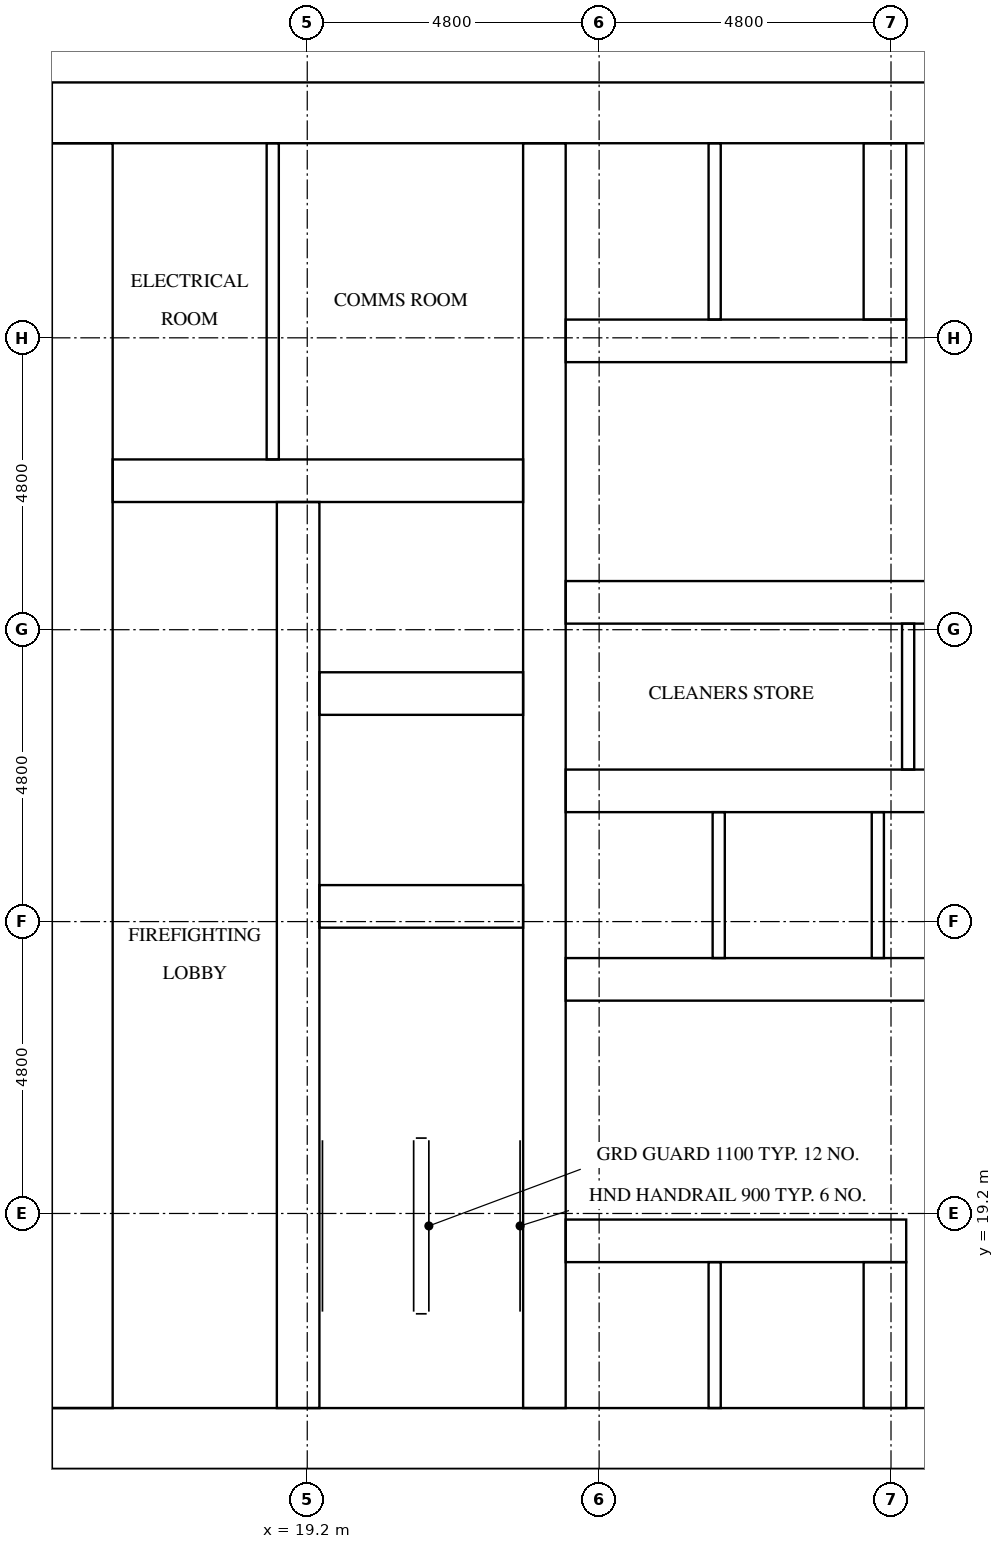
"""IFC4 building model, lengths in metres.
Left out: names, types, materials, properties, quantities, classifications, styles, units other than length and angle.
Written with IfcOpenShell. Run it as: python <this file> out.ifc"""

import sys

from ifc_helpers import new_model, si_unit, direction, frame, frame_2d, origin, place, context, subcontext, project, spatial, rectangle, extrude, element, fill, save


model = new_model("IFC4")
c1 = context("Model", 3, precision=1e-05, world=origin(), true_north=direction((0.0, 1.0)))
c2 = subcontext(c1, "Body", "Model", "MODEL_VIEW")
j1 = project(units=[si_unit("LENGTHUNIT", "METRE"), si_unit("PLANEANGLEUNIT", "RADIAN")], contexts=[c1])
p1 = place(None, origin())
s1 = spatial("IfcSite", under=j1, at=p1, CompositionType="ELEMENT")
p2 = place(p1, origin())
s2 = spatial("IfcBuilding", under=s1, at=p2, CompositionType="ELEMENT")
p3 = place(p2, frame((0.0, 0.0, 32.9)))
s3 = spatial("IfcBuildingStorey", under=s2, at=p3, CompositionType="ELEMENT", Elevation=32.9)
p4 = place(p3, frame((15.0, 15.5, 0.0), z_axis=(0.0, 0.0, 1.0), x_axis=(1.0, 0.0, 0.0)))
e1 = element("IfcWall", 1, at=p4, inside=s3, PredefinedType="SHEAR", context=c2, shape_type="SweptSolid", body=[
    extrude(rectangle(XDim=32.4, YDim=1.0, at=frame_2d((16.2, 0.0))), origin(), (0.0, 0.0, 1.0), 3.2),
])
p5 = place(p4, frame((15.3, 0.0, 0.0)))
e2 = element("IfcOpeningElement", 2, at=p5, cuts=e1, PredefinedType="OPENING", context=c2, shape_type="SweptSolid", body=[
    extrude(rectangle(XDim=1.8, YDim=2.1, at=frame_2d((0.9, 1.05))), frame((0.0, 0.51, 0.0), z_axis=(0.0, -1.0, 0.0), x_axis=(1.0, 0.0, 0.0)), (0.0, 0.0, 1.0), 1.02),
])
p6 = place(p3, frame((15.0, 37.3, 0.0), z_axis=(0.0, 0.0, 1.0), x_axis=(1.0, 0.0, 0.0)))
e3 = element("IfcWall", 3, at=p6, inside=s3, PredefinedType="SHEAR", context=c2, shape_type="SweptSolid", body=[
    extrude(rectangle(XDim=32.4, YDim=1.0, at=frame_2d((16.2, 0.0))), origin(), (0.0, 0.0, 1.0), 3.2),
])
p7 = place(p6, frame((15.3, 0.0, 0.0)))
e4 = element("IfcOpeningElement", 4, at=p7, cuts=e3, PredefinedType="OPENING", context=c2, shape_type="SweptSolid", body=[
    extrude(rectangle(XDim=1.8, YDim=2.1, at=frame_2d((0.9, 1.05))), frame((0.0, 0.51, 0.0), z_axis=(0.0, -1.0, 0.0), x_axis=(1.0, 0.0, 0.0)), (0.0, 0.0, 1.0), 1.02),
])
p8 = place(p6, frame((1.766, 0.0, 0.0)))
e5 = element("IfcOpeningElement", 5, at=p8, cuts=e3, PredefinedType="OPENING", context=c2, shape_type="SweptSolid", body=[
    extrude(rectangle(XDim=1.0, YDim=2.1, at=frame_2d((0.5, 1.05))), frame((0.0, 0.51, 0.0), z_axis=(0.0, -1.0, 0.0), x_axis=(1.0, 0.0, 0.0)), (0.0, 0.0, 1.0), 1.02),
])
p9 = place(p6, frame((5.241, 0.0, 0.0)))
e6 = element("IfcOpeningElement", 6, at=p9, cuts=e3, PredefinedType="OPENING", context=c2, shape_type="SweptSolid", body=[
    extrude(rectangle(XDim=1.0, YDim=2.1, at=frame_2d((0.5, 1.05))), frame((0.0, 0.51, 0.0), z_axis=(0.0, -1.0, 0.0), x_axis=(1.0, 0.0, 0.0)), (0.0, 0.0, 1.0), 1.02),
])
p10 = place(p3, frame((15.5, 16.0, 0.0), z_axis=(0.0, 0.0, 1.0), x_axis=(0.0, 1.0, 0.0)))
e7 = element("IfcWall", 7, at=p10, inside=s3, PredefinedType="SHEAR", context=c2, shape_type="SweptSolid", body=[
    extrude(rectangle(XDim=20.8, YDim=1.0, at=frame_2d((10.4, 0.0))), origin(), (0.0, 0.0, 1.0), 3.2),
])
p11 = place(p10, frame((4.76, 0.0, 0.0)))
e8 = element("IfcOpeningElement", 8, at=p11, cuts=e7, PredefinedType="OPENING", context=c2, shape_type="SweptSolid", body=[
    extrude(rectangle(XDim=1.2, YDim=2.1, at=frame_2d((0.6, 1.05))), frame((0.0, 0.51, 0.0), z_axis=(0.0, -1.0, 0.0), x_axis=(1.0, 0.0, 0.0)), (0.0, 0.0, 1.0), 1.02),
])
p12 = place(p3, frame((19.05, 16.0, 0.0), z_axis=(0.0, 0.0, 1.0), x_axis=(0.0, 1.0, 0.0)))
e9 = element("IfcWall", 9, at=p12, inside=s3, PredefinedType="SHEAR", context=c2, shape_type="SweptSolid", body=[
    extrude(rectangle(XDim=14.9, YDim=0.7, at=frame_2d((7.45, 0.0))), origin(), (0.0, 0.0, 1.0), 3.2),
])
p13 = place(p12, frame((9.45, 0.0, 0.0)))
e10 = element("IfcOpeningElement", 10, at=p13, cuts=e9, PredefinedType="OPENING", context=c2, shape_type="SweptSolid", body=[
    extrude(rectangle(XDim=1.1, YDim=2.1, at=frame_2d((0.55, 1.05))), frame((0.0, 0.36, 0.0), z_axis=(0.0, -1.0, 0.0), x_axis=(1.0, 0.0, 0.0)), (0.0, 0.0, 1.0), 0.72),
])
p14 = place(p12, frame((12.95, 0.0, 0.0)))
e11 = element("IfcOpeningElement", 11, at=p14, cuts=e9, PredefinedType="OPENING", context=c2, shape_type="SweptSolid", body=[
    extrude(rectangle(XDim=1.1, YDim=2.1, at=frame_2d((0.55, 1.05))), frame((0.0, 0.36, 0.0), z_axis=(0.0, -1.0, 0.0), x_axis=(1.0, 0.0, 0.0)), (0.0, 0.0, 1.0), 0.72),
])
p15 = place(p12, frame((0.2, 0.0, 0.0)))
e12 = element("IfcOpeningElement", 12, at=p15, cuts=e9, PredefinedType="OPENING", context=c2, shape_type="SweptSolid", body=[
    extrude(rectangle(XDim=1.2, YDim=2.1, at=frame_2d((0.6, 1.05))), frame((0.0, 0.36, 0.0), z_axis=(0.0, -1.0, 0.0), x_axis=(1.0, 0.0, 0.0)), (0.0, 0.0, 1.0), 0.72),
])
p16 = place(p3, frame((23.1, 16.0, 0.0), z_axis=(0.0, 0.0, 1.0), x_axis=(0.0, 1.0, 0.0)))
e13 = element("IfcWall", 13, at=p16, inside=s3, PredefinedType="SHEAR", context=c2, shape_type="SweptSolid", body=[
    extrude(rectangle(XDim=20.8, YDim=0.7, at=frame_2d((10.4, 0.0))), origin(), (0.0, 0.0, 1.0), 3.2),
])
for number, where, z_axis, x_axis in (
    (14, (19.4, 24.25, 0.0), (0.0, 0.0, 1.0), (1.0, 0.0, 0.0)),
    (15, (19.4, 27.75, 0.0), (0.0, 0.0, 1.0), (1.0, 0.0, 0.0)),
):
    element("IfcWall", number, at=place(p3, frame(where, z_axis=z_axis, x_axis=x_axis)), inside=s3, PredefinedType="SHEAR", context=c2, shape_type="SweptSolid", body=[
        extrude(rectangle(XDim=3.35, YDim=0.7, at=frame_2d((1.675, 0.0))), origin(), (0.0, 0.0, 1.0), 3.2),
    ])
p17 = place(p3, frame((16.0, 31.25, 0.0), z_axis=(0.0, 0.0, 1.0), x_axis=(1.0, 0.0, 0.0)))
e16 = element("IfcWall", 16, at=p17, inside=s3, PredefinedType="SHEAR", context=c2, shape_type="SweptSolid", body=[
    extrude(rectangle(XDim=6.75, YDim=0.7, at=frame_2d((3.375, 0.0))), origin(), (0.0, 0.0, 1.0), 3.2),
])
p18 = place(p3, frame((23.45, 18.75, 0.0), z_axis=(0.0, 0.0, 1.0), x_axis=(1.0, 0.0, 0.0)))
e17 = element("IfcWall", 17, at=p18, inside=s3, PredefinedType="SHEAR", context=c2, shape_type="SweptSolid", body=[
    extrude(rectangle(XDim=5.6, YDim=0.7, at=frame_2d((2.8, 0.0))), origin(), (0.0, 0.0, 1.0), 3.2),
])
p19 = place(p18, frame((0.625, 0.0, 0.0)))
e18 = element("IfcOpeningElement", 18, at=p19, cuts=e17, PredefinedType="OPENING", context=c2, shape_type="SweptSolid", body=[
    extrude(rectangle(XDim=1.1, YDim=2.1, at=frame_2d((0.55, 1.05))), frame((0.0, 0.36, 0.0), z_axis=(0.0, -1.0, 0.0), x_axis=(1.0, 0.0, 0.0)), (0.0, 0.0, 1.0), 0.72),
])
p20 = place(p18, frame((3.175, 0.0, 0.0)))
e19 = element("IfcOpeningElement", 19, at=p20, cuts=e17, PredefinedType="OPENING", context=c2, shape_type="SweptSolid", body=[
    extrude(rectangle(XDim=1.1, YDim=2.1, at=frame_2d((0.55, 1.05))), frame((0.0, 0.36, 0.0), z_axis=(0.0, -1.0, 0.0), x_axis=(1.0, 0.0, 0.0)), (0.0, 0.0, 1.0), 0.72),
])
p21 = place(p3, frame((23.45, 23.05, 0.0), z_axis=(0.0, 0.0, 1.0), x_axis=(1.0, 0.0, 0.0)))
e20 = element("IfcWall", 20, at=p21, inside=s3, PredefinedType="SHEAR", context=c2, shape_type="SweptSolid", body=[
    extrude(rectangle(XDim=15.5, YDim=0.7, at=frame_2d((7.75, 0.0))), origin(), (0.0, 0.0, 1.0), 3.2),
])
p22 = place(p21, frame((0.658, 0.0, 0.0)))
e21 = element("IfcOpeningElement", 21, at=p22, cuts=e20, PredefinedType="OPENING", context=c2, shape_type="SweptSolid", body=[
    extrude(rectangle(XDim=1.1, YDim=2.1, at=frame_2d((0.55, 1.05))), frame((0.0, 0.36, 0.0), z_axis=(0.0, -1.0, 0.0), x_axis=(1.0, 0.0, 0.0)), (0.0, 0.0, 1.0), 0.72),
])
p23 = place(p21, frame((3.275, 0.0, 0.0)))
e22 = element("IfcOpeningElement", 22, at=p23, cuts=e20, PredefinedType="OPENING", context=c2, shape_type="SweptSolid", body=[
    extrude(rectangle(XDim=1.1, YDim=2.1, at=frame_2d((0.55, 1.05))), frame((0.0, 0.36, 0.0), z_axis=(0.0, -1.0, 0.0), x_axis=(1.0, 0.0, 0.0)), (0.0, 0.0, 1.0), 0.72),
])
p24 = place(p21, frame((10.772, 0.0, 0.0)))
e23 = element("IfcOpeningElement", 23, at=p24, cuts=e20, PredefinedType="OPENING", context=c2, shape_type="SweptSolid", body=[
    extrude(rectangle(XDim=1.0, YDim=2.1, at=frame_2d((0.5, 1.05))), frame((0.0, 0.36, 0.0), z_axis=(0.0, -1.0, 0.0), x_axis=(1.0, 0.0, 0.0)), (0.0, 0.0, 1.0), 0.72),
])
p25 = place(p21, frame((13.389, 0.0, 0.0)))
e24 = element("IfcOpeningElement", 24, at=p25, cuts=e20, PredefinedType="OPENING", context=c2, shape_type="SweptSolid", body=[
    extrude(rectangle(XDim=1.0, YDim=2.1, at=frame_2d((0.5, 1.05))), frame((0.0, 0.36, 0.0), z_axis=(0.0, -1.0, 0.0), x_axis=(1.0, 0.0, 0.0)), (0.0, 0.0, 1.0), 0.72),
])
p26 = place(p3, frame((23.45, 26.15, 0.0), z_axis=(0.0, 0.0, 1.0), x_axis=(1.0, 0.0, 0.0)))
e25 = element("IfcWall", 25, at=p26, inside=s3, PredefinedType="SHEAR", context=c2, shape_type="SweptSolid", body=[
    extrude(rectangle(XDim=15.5, YDim=0.7, at=frame_2d((7.75, 0.0))), origin(), (0.0, 0.0, 1.0), 3.2),
])
p27 = place(p3, frame((23.45, 29.25, 0.0), z_axis=(0.0, 0.0, 1.0), x_axis=(1.0, 0.0, 0.0)))
e26 = element("IfcWall", 26, at=p27, inside=s3, PredefinedType="SHEAR", context=c2, shape_type="SweptSolid", body=[
    extrude(rectangle(XDim=15.5, YDim=0.7, at=frame_2d((7.75, 0.0))), origin(), (0.0, 0.0, 1.0), 3.2),
])
p28 = place(p27, frame((2.266, 0.0, 0.0)))
e27 = element("IfcOpeningElement", 27, at=p28, cuts=e26, PredefinedType="OPENING", context=c2, shape_type="SweptSolid", body=[
    extrude(rectangle(XDim=1.0, YDim=2.1, at=frame_2d((0.5, 1.05))), frame((0.0, 0.36, 0.0), z_axis=(0.0, -1.0, 0.0), x_axis=(1.0, 0.0, 0.0)), (0.0, 0.0, 1.0), 0.72),
])
p29 = place(p27, frame((7.018, 0.0, 0.0)))
e28 = element("IfcOpeningElement", 28, at=p29, cuts=e26, PredefinedType="OPENING", context=c2, shape_type="SweptSolid", body=[
    extrude(rectangle(XDim=1.0, YDim=2.1, at=frame_2d((0.5, 1.05))), frame((0.0, 0.36, 0.0), z_axis=(0.0, -1.0, 0.0), x_axis=(1.0, 0.0, 0.0)), (0.0, 0.0, 1.0), 0.72),
])
p30 = place(p27, frame((12.002, 0.0, 0.0)))
e29 = element("IfcOpeningElement", 29, at=p30, cuts=e26, PredefinedType="OPENING", context=c2, shape_type="SweptSolid", body=[
    extrude(rectangle(XDim=1.0, YDim=2.1, at=frame_2d((0.5, 1.05))), frame((0.0, 0.36, 0.0), z_axis=(0.0, -1.0, 0.0), x_axis=(1.0, 0.0, 0.0)), (0.0, 0.0, 1.0), 0.72),
])
p31 = place(p3, frame((23.45, 33.55, 0.0), z_axis=(0.0, 0.0, 1.0), x_axis=(1.0, 0.0, 0.0)))
e30 = element("IfcWall", 30, at=p31, inside=s3, PredefinedType="SHEAR", context=c2, shape_type="SweptSolid", body=[
    extrude(rectangle(XDim=5.6, YDim=0.7, at=frame_2d((2.8, 0.0))), origin(), (0.0, 0.0, 1.0), 3.2),
])
p32 = place(p3, frame((28.7, 16.0, 0.0), z_axis=(0.0, 0.0, 1.0), x_axis=(0.0, 1.0, 0.0)))
e31 = element("IfcWall", 31, at=p32, inside=s3, PredefinedType="SHEAR", context=c2, shape_type="SweptSolid", body=[
    extrude(rectangle(XDim=2.4, YDim=0.7, at=frame_2d((1.2, 0.0))), origin(), (0.0, 0.0, 1.0), 3.2),
])
p33 = place(p3, frame((28.7, 33.9, 0.0), z_axis=(0.0, 0.0, 1.0), x_axis=(0.0, 1.0, 0.0)))
e32 = element("IfcWall", 32, at=p33, inside=s3, PredefinedType="SHEAR", context=c2, shape_type="SweptSolid", body=[
    extrude(rectangle(XDim=2.9, YDim=0.7, at=frame_2d((1.45, 0.0))), origin(), (0.0, 0.0, 1.0), 3.2),
])
for number, where, z_axis, x_axis in (
    (33, (25.967, 23.4, 0.0), (0.0, 0.0, 1.0), (0.0, 1.0, 0.0)),
    (34, (28.583, 23.4, 0.0), (0.0, 0.0, 1.0), (0.0, 1.0, 0.0)),
):
    element("IfcWall", number, at=place(p3, frame(where, z_axis=z_axis, x_axis=x_axis)), inside=s3, PredefinedType="SOLIDWALL", context=c2, shape_type="SweptSolid", body=[
        extrude(rectangle(XDim=2.4, YDim=0.2, at=frame_2d((1.2, 0.0))), origin(), (0.0, 0.0, 1.0), 3.2),
    ])
p34 = place(p3, frame((25.9, 16.0, 0.0), z_axis=(0.0, 0.0, 1.0), x_axis=(0.0, 1.0, 0.0)))
e35 = element("IfcWall", 35, at=p34, inside=s3, PredefinedType="SOLIDWALL", context=c2, shape_type="SweptSolid", body=[
    extrude(rectangle(XDim=2.4, YDim=0.2, at=frame_2d((1.2, 0.0))), origin(), (0.0, 0.0, 1.0), 3.2),
])
p35 = place(p3, frame((25.9, 33.9, 0.0), z_axis=(0.0, 0.0, 1.0), x_axis=(0.0, 1.0, 0.0)))
e36 = element("IfcWall", 36, at=p35, inside=s3, PredefinedType="SOLIDWALL", context=c2, shape_type="SweptSolid", body=[
    extrude(rectangle(XDim=2.9, YDim=0.2, at=frame_2d((1.45, 0.0))), origin(), (0.0, 0.0, 1.0), 3.2),
])
p36 = place(p3, frame((18.633, 31.6, 0.0), z_axis=(0.0, 0.0, 1.0), x_axis=(0.0, 1.0, 0.0)))
e37 = element("IfcWall", 37, at=p36, inside=s3, PredefinedType="PARTITIONING", context=c2, shape_type="SweptSolid", body=[
    extrude(rectangle(XDim=5.2, YDim=0.2, at=frame_2d((2.6, 0.0))), origin(), (0.0, 0.0, 1.0), 3.2),
])
p37 = place(p3, frame((29.082, 26.5, 0.0), z_axis=(0.0, 0.0, 1.0), x_axis=(0.0, 1.0, 0.0)))
e38 = element("IfcWall", 38, at=p37, inside=s3, PredefinedType="PARTITIONING", context=c2, shape_type="SweptSolid", body=[
    extrude(rectangle(XDim=2.4, YDim=0.2, at=frame_2d((1.2, 0.0))), origin(), (0.0, 0.0, 1.0), 3.2),
])
p38 = place(p19, origin())
e39 = element("IfcDoor", 39, at=p38, inside=s3, OperationType="DOUBLE_DOOR_SLIDING", PredefinedType="DOOR", context=c2, shape_type="SweptSolid", body=[
    extrude(rectangle(XDim=1.1, YDim=2.1, at=frame_2d((0.55, 1.05))), frame((0.0, 0.025, 0.0), z_axis=(0.0, -1.0, 0.0), x_axis=(1.0, 0.0, 0.0)), (0.0, 0.0, 1.0), 0.05),
])
fill(e18, e39)
p39 = place(p20, origin())
e40 = element("IfcDoor", 40, at=p39, inside=s3, OperationType="DOUBLE_DOOR_SLIDING", PredefinedType="DOOR", context=c2, shape_type="SweptSolid", body=[
    extrude(rectangle(XDim=1.1, YDim=2.1, at=frame_2d((0.55, 1.05))), frame((0.0, 0.025, 0.0), z_axis=(0.0, -1.0, 0.0), x_axis=(1.0, 0.0, 0.0)), (0.0, 0.0, 1.0), 0.05),
])
fill(e19, e40)
p40 = place(p22, origin())
e41 = element("IfcDoor", 41, at=p40, inside=s3, OperationType="DOUBLE_DOOR_SLIDING", PredefinedType="DOOR", context=c2, shape_type="SweptSolid", body=[
    extrude(rectangle(XDim=1.1, YDim=2.1, at=frame_2d((0.55, 1.05))), frame((0.0, 0.025, 0.0), z_axis=(0.0, -1.0, 0.0), x_axis=(1.0, 0.0, 0.0)), (0.0, 0.0, 1.0), 0.05),
])
fill(e21, e41)
p41 = place(p23, origin())
e42 = element("IfcDoor", 42, at=p41, inside=s3, OperationType="DOUBLE_DOOR_SLIDING", PredefinedType="DOOR", context=c2, shape_type="SweptSolid", body=[
    extrude(rectangle(XDim=1.1, YDim=2.1, at=frame_2d((0.55, 1.05))), frame((0.0, 0.025, 0.0), z_axis=(0.0, -1.0, 0.0), x_axis=(1.0, 0.0, 0.0)), (0.0, 0.0, 1.0), 0.05),
])
fill(e22, e42)
p42 = place(p13, origin())
e43 = element("IfcDoor", 43, at=p42, inside=s3, OperationType="DOUBLE_DOOR_SLIDING", PredefinedType="DOOR", context=c2, shape_type="SweptSolid", body=[
    extrude(rectangle(XDim=1.1, YDim=2.1, at=frame_2d((0.55, 1.05))), frame((0.0, 0.025, 0.0), z_axis=(0.0, -1.0, 0.0), x_axis=(1.0, 0.0, 0.0)), (0.0, 0.0, 1.0), 0.05),
])
fill(e10, e43)
p43 = place(p14, origin())
e44 = element("IfcDoor", 44, at=p43, inside=s3, OperationType="DOUBLE_DOOR_SLIDING", PredefinedType="DOOR", context=c2, shape_type="SweptSolid", body=[
    extrude(rectangle(XDim=1.1, YDim=2.1, at=frame_2d((0.55, 1.05))), frame((0.0, 0.025, 0.0), z_axis=(0.0, -1.0, 0.0), x_axis=(1.0, 0.0, 0.0)), (0.0, 0.0, 1.0), 0.05),
])
fill(e11, e44)
p44 = place(p15, frame((1.2, 0.0, 0.0), z_axis=(0.0, 0.0, 1.0), x_axis=(-1.0, 0.0, 0.0)))
e45 = element("IfcDoor", 45, at=p44, inside=s3, OperationType="SINGLE_SWING_LEFT", PredefinedType="DOOR", context=c2, shape_type="SweptSolid", body=[
    extrude(rectangle(XDim=1.2, YDim=2.1, at=frame_2d((0.6, 1.05))), frame((0.0, 0.025, 0.0), z_axis=(0.0, -1.0, 0.0), x_axis=(1.0, 0.0, 0.0)), (0.0, 0.0, 1.0), 0.05),
])
fill(e12, e45)
p45 = place(p11, frame((1.2, 0.0, 0.0), z_axis=(0.0, 0.0, 1.0), x_axis=(-1.0, 0.0, 0.0)))
e46 = element("IfcDoor", 46, at=p45, inside=s3, OperationType="SINGLE_SWING_RIGHT", PredefinedType="DOOR", context=c2, shape_type="SweptSolid", body=[
    extrude(rectangle(XDim=1.2, YDim=2.1, at=frame_2d((0.6, 1.05))), frame((0.0, 0.025, 0.0), z_axis=(0.0, -1.0, 0.0), x_axis=(1.0, 0.0, 0.0)), (0.0, 0.0, 1.0), 0.05),
])
fill(e8, e46)
p46 = place(p8, origin())
e47 = element("IfcDoor", 47, at=p46, inside=s3, OperationType="SINGLE_SWING_RIGHT", PredefinedType="DOOR", context=c2, shape_type="SweptSolid", body=[
    extrude(rectangle(XDim=1.0, YDim=2.1, at=frame_2d((0.5, 1.05))), frame((0.0, 0.025, 0.0), z_axis=(0.0, -1.0, 0.0), x_axis=(1.0, 0.0, 0.0)), (0.0, 0.0, 1.0), 0.05),
])
fill(e5, e47)
p47 = place(p9, origin())
e48 = element("IfcDoor", 48, at=p47, inside=s3, OperationType="SINGLE_SWING_LEFT", PredefinedType="DOOR", context=c2, shape_type="SweptSolid", body=[
    extrude(rectangle(XDim=1.0, YDim=2.1, at=frame_2d((0.5, 1.05))), frame((0.0, 0.025, 0.0), z_axis=(0.0, -1.0, 0.0), x_axis=(1.0, 0.0, 0.0)), (0.0, 0.0, 1.0), 0.05),
])
fill(e6, e48)
p48 = place(p28, origin())
e49 = element("IfcDoor", 49, at=p48, inside=s3, OperationType="SINGLE_SWING_RIGHT", PredefinedType="DOOR", context=c2, shape_type="SweptSolid", body=[
    extrude(rectangle(XDim=1.0, YDim=2.1, at=frame_2d((0.5, 1.05))), frame((0.0, 0.025, 0.0), z_axis=(0.0, -1.0, 0.0), x_axis=(1.0, 0.0, 0.0)), (0.0, 0.0, 1.0), 0.05),
])
fill(e27, e49)
save(model, sys.argv[1])
